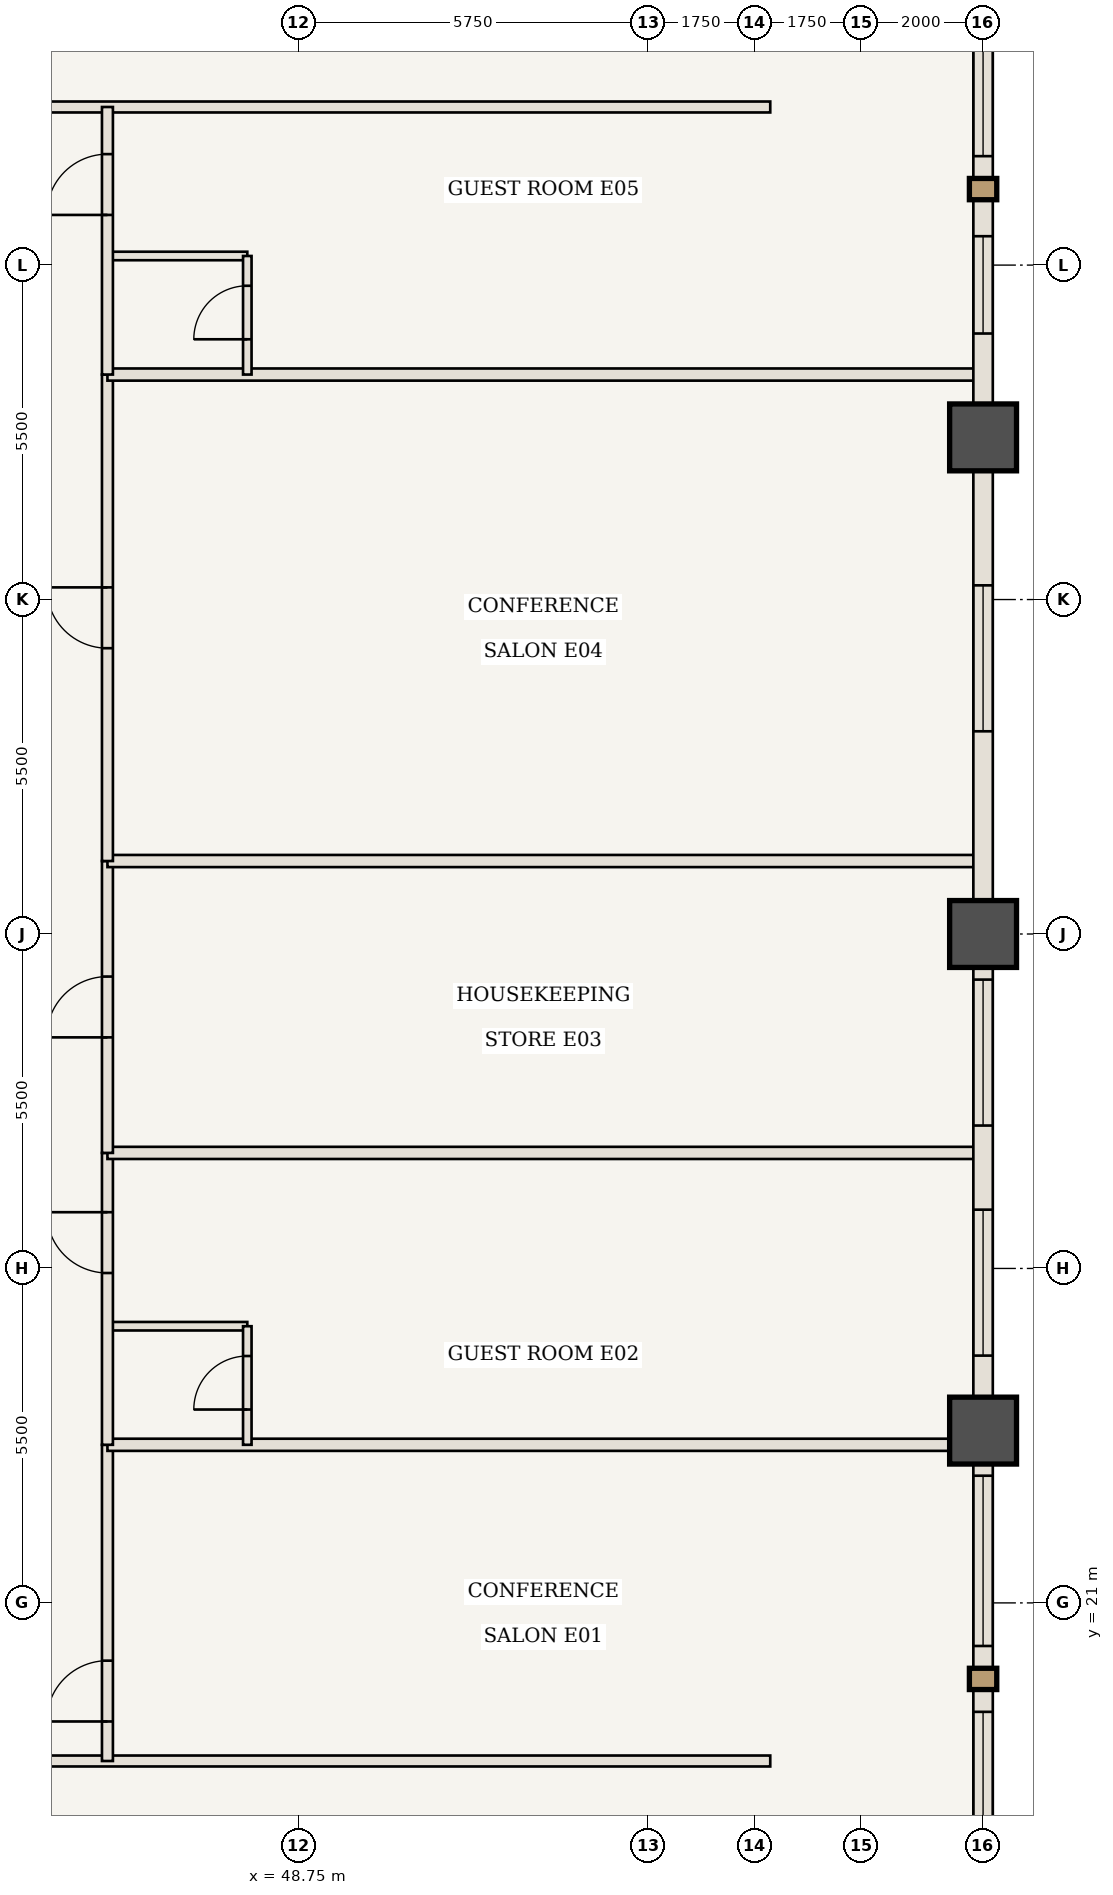
"""IFC4 building model, lengths in metres.
Left out: names, types, materials, properties, quantities, classifications, styles, units other than length and angle.
Written with IfcOpenShell. Run it as: python <this file> out.ifc"""

import sys

from ifc_helpers import new_model, si_unit, direction, frame, frame_2d, origin, origin_2d, place, context, subcontext, project, spatial, rectangle, extrude, element, fill, save


model = new_model("IFC4")
c1 = context("Model", 3, precision=1e-05, world=origin(), true_north=direction((0.0, 1.0)))
c2 = subcontext(c1, "Body", "Model", "MODEL_VIEW")
j1 = project(units=[si_unit("LENGTHUNIT", "METRE"), si_unit("PLANEANGLEUNIT", "RADIAN")], contexts=[c1])
p1 = place(None, origin())
s1 = spatial("IfcSite", under=j1, at=p1, CompositionType="ELEMENT")
p2 = place(p1, origin())
s2 = spatial("IfcBuilding", under=s1, at=p2, CompositionType="ELEMENT")
p3 = place(p2, frame((0.0, 0.0, 38.85)))
s3 = spatial("IfcBuildingStorey", under=s2, at=p3, CompositionType="ELEMENT", Elevation=38.85)
for number, where, z_axis, x_axis in (
    (1, (60.0, 23.833, 0.0), (0.0, 0.0, 1.0), (1.0, 0.0, 0.0)),
    (2, (60.0, 32.0, 0.0), (0.0, 0.0, 1.0), (1.0, 0.0, 0.0)),
    (3, (60.0, 40.167, 0.0), (0.0, 0.0, 1.0), (1.0, 0.0, 0.0)),
):
    element("IfcColumn", number, at=place(p3, frame(where, z_axis=z_axis, x_axis=x_axis)), inside=s3, PredefinedType="COLUMN", context=c2, shape_type="SweptSolid", body=[
        extrude(rectangle(XDim=1.1, YDim=1.1, at=origin_2d()), origin(), (0.0, 0.0, 1.0), 3.5),
    ])
p4 = place(p3, frame((37.9, 18.4, 0.0), z_axis=(0.0, 0.0, 1.0), x_axis=(1.0, 0.0, 0.0)))
e4 = element("IfcWall", 4, at=p4, inside=s3, PredefinedType="STANDARD", context=c2, shape_type="SweptSolid", body=[
    extrude(rectangle(XDim=18.6, YDim=0.18, at=frame_2d((9.3, 0.0))), origin(), (0.0, 0.0, 1.0), 3.08),
])
p5 = place(p4, frame((4.775, 0.0, 0.0)))
e5 = element("IfcOpeningElement", 5, at=p5, cuts=e4, PredefinedType="OPENING", context=c2, shape_type="SweptSolid", body=[
    extrude(rectangle(XDim=1.0, YDim=2.15, at=frame_2d((0.5, 1.075))), frame((0.0, 0.1, 0.0), z_axis=(0.0, -1.0, 0.0), x_axis=(1.0, 0.0, 0.0)), (0.0, 0.0, 1.0), 0.2),
])
p6 = place(p3, frame((38.2, 45.6, 0.0), z_axis=(0.0, 0.0, 1.0), x_axis=(1.0, 0.0, 0.0)))
e6 = element("IfcWall", 6, at=p6, inside=s3, PredefinedType="STANDARD", context=c2, shape_type="SweptSolid", body=[
    extrude(rectangle(XDim=18.3, YDim=0.18, at=frame_2d((9.15, 0.0))), origin(), (0.0, 0.0, 1.0), 3.08),
])
p7 = place(p6, frame((4.625, 0.0, 0.0)))
e7 = element("IfcOpeningElement", 7, at=p7, cuts=e6, PredefinedType="OPENING", context=c2, shape_type="SweptSolid", body=[
    extrude(rectangle(XDim=1.0, YDim=2.15, at=frame_2d((0.5, 1.075))), frame((0.0, 0.1, 0.0), z_axis=(0.0, -1.0, 0.0), x_axis=(1.0, 0.0, 0.0)), (0.0, 0.0, 1.0), 0.2),
])
p8 = place(p3, frame((45.6, 18.4, 0.0), z_axis=(0.0, 0.0, 1.0), x_axis=(0.0, 1.0, 0.0)))
e8 = element("IfcWall", 8, at=p8, inside=s3, PredefinedType="STANDARD", context=c2, shape_type="SweptSolid", body=[
    extrude(rectangle(XDim=5.2, YDim=0.18, at=frame_2d((2.6, 0.0))), origin(), (0.0, 0.0, 1.0), 3.08),
])
p9 = place(p8, frame((0.65, 0.0, 0.0)))
e9 = element("IfcOpeningElement", 9, at=p9, cuts=e8, PredefinedType="OPENING", context=c2, shape_type="SweptSolid", body=[
    extrude(rectangle(XDim=1.0, YDim=2.15, at=frame_2d((0.5, 1.075))), frame((0.0, 0.1, 0.0), z_axis=(0.0, -1.0, 0.0), x_axis=(1.0, 0.0, 0.0)), (0.0, 0.0, 1.0), 0.2),
])
p10 = place(p3, frame((45.6, 23.6, 0.0), z_axis=(0.0, 0.0, 1.0), x_axis=(1.0, 0.0, 0.0)))
e10 = element("IfcWall", 10, at=p10, inside=s3, PredefinedType="STANDARD", context=c2, shape_type="SweptSolid", body=[
    extrude(rectangle(XDim=14.34, YDim=0.2, at=frame_2d((7.17, 0.0))), origin(), (0.0, 0.0, 1.0), 3.08),
])
p11 = place(p3, frame((45.6, 25.55, 0.0), z_axis=(0.0, 0.0, 1.0), x_axis=(1.0, 0.0, 0.0)))
e11 = element("IfcWall", 11, at=p11, inside=s3, PredefinedType="STANDARD", context=c2, shape_type="SweptSolid", body=[
    extrude(rectangle(XDim=2.3, YDim=0.14, at=frame_2d((1.15, 0.0))), origin(), (0.0, 0.0, 1.0), 3.08),
])
p12 = place(p3, frame((47.9, 23.6, 0.0), z_axis=(0.0, 0.0, 1.0), x_axis=(0.0, 1.0, 0.0)))
e12 = element("IfcWall", 12, at=p12, inside=s3, PredefinedType="STANDARD", context=c2, shape_type="SweptSolid", body=[
    extrude(rectangle(XDim=1.95, YDim=0.14, at=frame_2d((0.975, 0.0))), origin(), (0.0, 0.0, 1.0), 3.08),
])
p13 = place(p12, frame((0.58, 0.0, 0.0)))
e13 = element("IfcOpeningElement", 13, at=p13, cuts=e12, PredefinedType="OPENING", context=c2, shape_type="SweptSolid", body=[
    extrude(rectangle(XDim=0.88, YDim=2.1, at=frame_2d((0.44, 1.05))), frame((0.0, 0.08, 0.0), z_axis=(0.0, -1.0, 0.0), x_axis=(1.0, 0.0, 0.0)), (0.0, 0.0, 1.0), 0.16),
])
p14 = place(p3, frame((45.6, 23.6, 0.0), z_axis=(0.0, 0.0, 1.0), x_axis=(0.0, 1.0, 0.0)))
e14 = element("IfcWall", 14, at=p14, inside=s3, PredefinedType="STANDARD", context=c2, shape_type="SweptSolid", body=[
    extrude(rectangle(XDim=4.8, YDim=0.18, at=frame_2d((2.4, 0.0))), origin(), (0.0, 0.0, 1.0), 3.08),
])
p15 = place(p14, frame((2.825, 0.0, 0.0)))
e15 = element("IfcOpeningElement", 15, at=p15, cuts=e14, PredefinedType="OPENING", context=c2, shape_type="SweptSolid", body=[
    extrude(rectangle(XDim=1.0, YDim=2.15, at=frame_2d((0.5, 1.075))), frame((0.0, 0.1, 0.0), z_axis=(0.0, -1.0, 0.0), x_axis=(1.0, 0.0, 0.0)), (0.0, 0.0, 1.0), 0.2),
])
p16 = place(p3, frame((45.6, 28.4, 0.0), z_axis=(0.0, 0.0, 1.0), x_axis=(1.0, 0.0, 0.0)))
e16 = element("IfcWall", 16, at=p16, inside=s3, PredefinedType="STANDARD", context=c2, shape_type="SweptSolid", body=[
    extrude(rectangle(XDim=14.34, YDim=0.2, at=frame_2d((7.17, 0.0))), origin(), (0.0, 0.0, 1.0), 3.08),
])
p17 = place(p3, frame((45.6, 28.4, 0.0), z_axis=(0.0, 0.0, 1.0), x_axis=(0.0, 1.0, 0.0)))
e17 = element("IfcWall", 17, at=p17, inside=s3, PredefinedType="STANDARD", context=c2, shape_type="SweptSolid", body=[
    extrude(rectangle(XDim=4.8, YDim=0.18, at=frame_2d((2.4, 0.0))), origin(), (0.0, 0.0, 1.0), 3.08),
])
p18 = place(p17, frame((1.9, 0.0, 0.0)))
e18 = element("IfcOpeningElement", 18, at=p18, cuts=e17, PredefinedType="OPENING", context=c2, shape_type="SweptSolid", body=[
    extrude(rectangle(XDim=1.0, YDim=2.15, at=frame_2d((0.5, 1.075))), frame((0.0, 0.1, 0.0), z_axis=(0.0, -1.0, 0.0), x_axis=(1.0, 0.0, 0.0)), (0.0, 0.0, 1.0), 0.2),
])
p19 = place(p3, frame((45.6, 33.2, 0.0), z_axis=(0.0, 0.0, 1.0), x_axis=(1.0, 0.0, 0.0)))
e19 = element("IfcWall", 19, at=p19, inside=s3, PredefinedType="STANDARD", context=c2, shape_type="SweptSolid", body=[
    extrude(rectangle(XDim=14.34, YDim=0.2, at=frame_2d((7.17, 0.0))), origin(), (0.0, 0.0, 1.0), 3.08),
])
p20 = place(p3, frame((45.6, 33.2, 0.0), z_axis=(0.0, 0.0, 1.0), x_axis=(0.0, 1.0, 0.0)))
e20 = element("IfcWall", 20, at=p20, inside=s3, PredefinedType="STANDARD", context=c2, shape_type="SweptSolid", body=[
    extrude(rectangle(XDim=8.0, YDim=0.18, at=frame_2d((4.0, 0.0))), origin(), (0.0, 0.0, 1.0), 3.08),
])
p21 = place(p20, frame((3.5, 0.0, 0.0)))
e21 = element("IfcOpeningElement", 21, at=p21, cuts=e20, PredefinedType="OPENING", context=c2, shape_type="SweptSolid", body=[
    extrude(rectangle(XDim=1.0, YDim=2.15, at=frame_2d((0.5, 1.075))), frame((0.0, 0.1, 0.0), z_axis=(0.0, -1.0, 0.0), x_axis=(1.0, 0.0, 0.0)), (0.0, 0.0, 1.0), 0.2),
])
p22 = place(p3, frame((45.6, 41.2, 0.0), z_axis=(0.0, 0.0, 1.0), x_axis=(1.0, 0.0, 0.0)))
e22 = element("IfcWall", 22, at=p22, inside=s3, PredefinedType="STANDARD", context=c2, shape_type="SweptSolid", body=[
    extrude(rectangle(XDim=14.34, YDim=0.2, at=frame_2d((7.17, 0.0))), origin(), (0.0, 0.0, 1.0), 3.08),
])
p23 = place(p3, frame((45.6, 43.15, 0.0), z_axis=(0.0, 0.0, 1.0), x_axis=(1.0, 0.0, 0.0)))
e23 = element("IfcWall", 23, at=p23, inside=s3, PredefinedType="STANDARD", context=c2, shape_type="SweptSolid", body=[
    extrude(rectangle(XDim=2.3, YDim=0.14, at=frame_2d((1.15, 0.0))), origin(), (0.0, 0.0, 1.0), 2.375),
])
p24 = place(p3, frame((47.9, 41.2, 0.0), z_axis=(0.0, 0.0, 1.0), x_axis=(0.0, 1.0, 0.0)))
e24 = element("IfcWall", 24, at=p24, inside=s3, PredefinedType="STANDARD", context=c2, shape_type="SweptSolid", body=[
    extrude(rectangle(XDim=1.95, YDim=0.14, at=frame_2d((0.975, 0.0))), origin(), (0.0, 0.0, 1.0), 3.08),
])
p25 = place(p24, frame((0.58, 0.0, 0.0)))
e25 = element("IfcOpeningElement", 25, at=p25, cuts=e24, PredefinedType="OPENING", context=c2, shape_type="SweptSolid", body=[
    extrude(rectangle(XDim=0.88, YDim=2.1, at=frame_2d((0.44, 1.05))), frame((0.0, 0.08, 0.0), z_axis=(0.0, -1.0, 0.0), x_axis=(1.0, 0.0, 0.0)), (0.0, 0.0, 1.0), 0.16),
])
p26 = place(p3, frame((45.6, 41.2, 0.0), z_axis=(0.0, 0.0, 1.0), x_axis=(0.0, 1.0, 0.0)))
e26 = element("IfcWall", 26, at=p26, inside=s3, PredefinedType="STANDARD", context=c2, shape_type="SweptSolid", body=[
    extrude(rectangle(XDim=4.4, YDim=0.18, at=frame_2d((2.2, 0.0))), origin(), (0.0, 0.0, 1.0), 3.08),
])
p27 = place(p26, frame((2.625, 0.0, 0.0)))
e27 = element("IfcOpeningElement", 27, at=p27, cuts=e26, PredefinedType="OPENING", context=c2, shape_type="SweptSolid", body=[
    extrude(rectangle(XDim=1.0, YDim=2.15, at=frame_2d((0.5, 1.075))), frame((0.0, 0.1, 0.0), z_axis=(0.0, -1.0, 0.0), x_axis=(1.0, 0.0, 0.0)), (0.0, 0.0, 1.0), 0.2),
])
p28 = place(p3, frame((60.0, 23.833, 0.0), z_axis=(0.0, 0.0, 1.0), x_axis=(0.0, -1.0, 0.0)))
e28 = element("IfcWall", 28, at=p28, inside=s3, PredefinedType="USERDEFINED", context=c2, shape_type="SweptSolid", body=[
    extrude(rectangle(XDim=8.167, YDim=0.32, at=frame_2d((4.083, 0.0))), origin(), (0.0, 0.0, 1.0), 2.28),
])
p29 = place(p28, frame((0.742, 0.0, 0.85)))
e29 = element("IfcOpeningElement", 29, at=p29, cuts=e28, PredefinedType="OPENING", context=c2, shape_type="SweptSolid", body=[
    extrude(rectangle(XDim=2.8, YDim=1.23, at=frame_2d((1.4, 0.615))), frame((0.0, 0.17, 0.0), z_axis=(0.0, -1.0, 0.0), x_axis=(1.0, 0.0, 0.0)), (0.0, 0.0, 1.0), 0.34),
])
p30 = place(p28, frame((4.625, 0.0, 0.85)))
e30 = element("IfcOpeningElement", 30, at=p30, cuts=e28, PredefinedType="OPENING", context=c2, shape_type="SweptSolid", body=[
    extrude(rectangle(XDim=2.8, YDim=1.23, at=frame_2d((1.4, 0.615))), frame((0.0, 0.17, 0.0), z_axis=(0.0, -1.0, 0.0), x_axis=(1.0, 0.0, 0.0)), (0.0, 0.0, 1.0), 0.34),
])
p31 = place(p3, frame((60.0, 32.0, 0.0), z_axis=(0.0, 0.0, 1.0), x_axis=(0.0, -1.0, 0.0)))
e31 = element("IfcWall", 31, at=p31, inside=s3, PredefinedType="USERDEFINED", context=c2, shape_type="SweptSolid", body=[
    extrude(rectangle(XDim=8.167, YDim=0.32, at=frame_2d((4.083, 0.0))), origin(), (0.0, 0.0, 1.0), 2.28),
])
p32 = place(p31, frame((0.75, 0.0, 0.85)))
e32 = element("IfcOpeningElement", 32, at=p32, cuts=e31, PredefinedType="OPENING", context=c2, shape_type="SweptSolid", body=[
    extrude(rectangle(XDim=2.4, YDim=1.23, at=frame_2d((1.2, 0.615))), frame((0.0, 0.17, 0.0), z_axis=(0.0, -1.0, 0.0), x_axis=(1.0, 0.0, 0.0)), (0.0, 0.0, 1.0), 0.34),
])
p33 = place(p31, frame((4.533, 0.0, 0.85)))
e33 = element("IfcOpeningElement", 33, at=p33, cuts=e31, PredefinedType="OPENING", context=c2, shape_type="SweptSolid", body=[
    extrude(rectangle(XDim=2.4, YDim=1.23, at=frame_2d((1.2, 0.615))), frame((0.0, 0.17, 0.0), z_axis=(0.0, -1.0, 0.0), x_axis=(1.0, 0.0, 0.0)), (0.0, 0.0, 1.0), 0.34),
])
p34 = place(p3, frame((60.0, 40.167, 0.0), z_axis=(0.0, 0.0, 1.0), x_axis=(0.0, -1.0, 0.0)))
e34 = element("IfcWall", 34, at=p34, inside=s3, PredefinedType="USERDEFINED", context=c2, shape_type="SweptSolid", body=[
    extrude(rectangle(XDim=8.167, YDim=0.32, at=frame_2d((4.083, 0.0))), origin(), (0.0, 0.0, 1.0), 2.28),
])
p35 = place(p34, frame((2.433, 0.0, 0.85)))
e35 = element("IfcOpeningElement", 35, at=p35, cuts=e34, PredefinedType="OPENING", context=c2, shape_type="SweptSolid", body=[
    extrude(rectangle(XDim=2.4, YDim=1.23, at=frame_2d((1.2, 0.615))), frame((0.0, 0.17, 0.0), z_axis=(0.0, -1.0, 0.0), x_axis=(1.0, 0.0, 0.0)), (0.0, 0.0, 1.0), 0.34),
])
p36 = place(p3, frame((60.0, 48.333, 0.0), z_axis=(0.0, 0.0, 1.0), x_axis=(0.0, -1.0, 0.0)))
e36 = element("IfcWall", 36, at=p36, inside=s3, PredefinedType="USERDEFINED", context=c2, shape_type="SweptSolid", body=[
    extrude(rectangle(XDim=8.167, YDim=0.32, at=frame_2d((4.083, 0.0))), origin(), (0.0, 0.0, 1.0), 2.28),
])
p37 = place(p36, frame((0.742, 0.0, 0.85)))
e37 = element("IfcOpeningElement", 37, at=p37, cuts=e36, PredefinedType="OPENING", context=c2, shape_type="SweptSolid", body=[
    extrude(rectangle(XDim=2.8, YDim=1.23, at=frame_2d((1.4, 0.615))), frame((0.0, 0.17, 0.0), z_axis=(0.0, -1.0, 0.0), x_axis=(1.0, 0.0, 0.0)), (0.0, 0.0, 1.0), 0.34),
])
p38 = place(p36, frame((4.858, 0.0, 0.85)))
e38 = element("IfcOpeningElement", 38, at=p38, cuts=e36, PredefinedType="OPENING", context=c2, shape_type="SweptSolid", body=[
    extrude(rectangle(XDim=1.6, YDim=1.23, at=frame_2d((0.8, 0.615))), frame((0.0, 0.17, 0.0), z_axis=(0.0, -1.0, 0.0), x_axis=(1.0, 0.0, 0.0)), (0.0, 0.0, 1.0), 0.34),
])
p39 = place(p9, origin())
e39 = element("IfcDoor", 39, at=p39, inside=s3, OperationType="SINGLE_SWING_LEFT", PredefinedType="DOOR", context=c2, shape_type="SweptSolid", body=[
    extrude(rectangle(XDim=1.0, YDim=2.15, at=frame_2d((0.5, 1.075))), frame((0.0, 0.025, 0.0), z_axis=(0.0, -1.0, 0.0), x_axis=(1.0, 0.0, 0.0)), (0.0, 0.0, 1.0), 0.05),
])
fill(e9, e39)
p40 = place(p13, origin())
e40 = element("IfcDoor", 40, at=p40, inside=s3, OperationType="SINGLE_SWING_LEFT", PredefinedType="DOOR", context=c2, shape_type="SweptSolid", body=[
    extrude(rectangle(XDim=0.88, YDim=2.1, at=frame_2d((0.44, 1.05))), frame((0.0, 0.025, 0.0), z_axis=(0.0, -1.0, 0.0), x_axis=(1.0, 0.0, 0.0)), (0.0, 0.0, 1.0), 0.05),
])
fill(e13, e40)
p41 = place(p15, origin())
e41 = element("IfcDoor", 41, at=p41, inside=s3, OperationType="SINGLE_SWING_RIGHT", PredefinedType="DOOR", context=c2, shape_type="SweptSolid", body=[
    extrude(rectangle(XDim=1.0, YDim=2.15, at=frame_2d((0.5, 1.075))), frame((0.0, 0.025, 0.0), z_axis=(0.0, -1.0, 0.0), x_axis=(1.0, 0.0, 0.0)), (0.0, 0.0, 1.0), 0.05),
])
fill(e15, e41)
p42 = place(p18, origin())
e42 = element("IfcDoor", 42, at=p42, inside=s3, OperationType="SINGLE_SWING_LEFT", PredefinedType="DOOR", context=c2, shape_type="SweptSolid", body=[
    extrude(rectangle(XDim=1.0, YDim=2.15, at=frame_2d((0.5, 1.075))), frame((0.0, 0.025, 0.0), z_axis=(0.0, -1.0, 0.0), x_axis=(1.0, 0.0, 0.0)), (0.0, 0.0, 1.0), 0.05),
])
fill(e18, e42)
p43 = place(p21, origin())
e43 = element("IfcDoor", 43, at=p43, inside=s3, OperationType="SINGLE_SWING_RIGHT", PredefinedType="DOOR", context=c2, shape_type="SweptSolid", body=[
    extrude(rectangle(XDim=1.0, YDim=2.15, at=frame_2d((0.5, 1.075))), frame((0.0, 0.025, 0.0), z_axis=(0.0, -1.0, 0.0), x_axis=(1.0, 0.0, 0.0)), (0.0, 0.0, 1.0), 0.05),
])
fill(e21, e43)
p44 = place(p25, origin())
e44 = element("IfcDoor", 44, at=p44, inside=s3, OperationType="SINGLE_SWING_LEFT", PredefinedType="DOOR", context=c2, shape_type="SweptSolid", body=[
    extrude(rectangle(XDim=0.88, YDim=2.1, at=frame_2d((0.44, 1.05))), frame((0.0, 0.025, 0.0), z_axis=(0.0, -1.0, 0.0), x_axis=(1.0, 0.0, 0.0)), (0.0, 0.0, 1.0), 0.05),
])
fill(e25, e44)
p45 = place(p27, origin())
e45 = element("IfcDoor", 45, at=p45, inside=s3, OperationType="SINGLE_SWING_LEFT", PredefinedType="DOOR", context=c2, shape_type="SweptSolid", body=[
    extrude(rectangle(XDim=1.0, YDim=2.15, at=frame_2d((0.5, 1.075))), frame((0.0, 0.025, 0.0), z_axis=(0.0, -1.0, 0.0), x_axis=(1.0, 0.0, 0.0)), (0.0, 0.0, 1.0), 0.05),
])
fill(e27, e45)
p46 = place(p29, origin())
e46 = element("IfcWindow", 46, at=p46, inside=s3, PartitioningType="SINGLE_PANEL", PredefinedType="WINDOW", context=c2, shape_type="SweptSolid", body=[
    extrude(rectangle(XDim=2.8, YDim=1.23, at=frame_2d((1.4, 0.615))), frame((0.0, 0.03, 0.0), z_axis=(0.0, -1.0, 0.0), x_axis=(1.0, 0.0, 0.0)), (0.0, 0.0, 1.0), 0.06),
])
fill(e29, e46)
p47 = place(p30, origin())
e47 = element("IfcWindow", 47, at=p47, inside=s3, PartitioningType="SINGLE_PANEL", PredefinedType="WINDOW", context=c2, shape_type="SweptSolid", body=[
    extrude(rectangle(XDim=2.8, YDim=1.23, at=frame_2d((1.4, 0.615))), frame((0.0, 0.03, 0.0), z_axis=(0.0, -1.0, 0.0), x_axis=(1.0, 0.0, 0.0)), (0.0, 0.0, 1.0), 0.06),
])
fill(e30, e47)
p48 = place(p32, origin())
e48 = element("IfcWindow", 48, at=p48, inside=s3, PartitioningType="SINGLE_PANEL", PredefinedType="WINDOW", context=c2, shape_type="SweptSolid", body=[
    extrude(rectangle(XDim=2.4, YDim=1.23, at=frame_2d((1.2, 0.615))), frame((0.0, 0.03, 0.0), z_axis=(0.0, -1.0, 0.0), x_axis=(1.0, 0.0, 0.0)), (0.0, 0.0, 1.0), 0.06),
])
fill(e32, e48)
p49 = place(p33, origin())
e49 = element("IfcWindow", 49, at=p49, inside=s3, PartitioningType="SINGLE_PANEL", PredefinedType="WINDOW", context=c2, shape_type="SweptSolid", body=[
    extrude(rectangle(XDim=2.4, YDim=1.23, at=frame_2d((1.2, 0.615))), frame((0.0, 0.03, 0.0), z_axis=(0.0, -1.0, 0.0), x_axis=(1.0, 0.0, 0.0)), (0.0, 0.0, 1.0), 0.06),
])
fill(e33, e49)
p50 = place(p35, origin())
e50 = element("IfcWindow", 50, at=p50, inside=s3, PartitioningType="SINGLE_PANEL", PredefinedType="WINDOW", context=c2, shape_type="SweptSolid", body=[
    extrude(rectangle(XDim=2.4, YDim=1.23, at=frame_2d((1.2, 0.615))), frame((0.0, 0.03, 0.0), z_axis=(0.0, -1.0, 0.0), x_axis=(1.0, 0.0, 0.0)), (0.0, 0.0, 1.0), 0.06),
])
fill(e35, e50)
p51 = place(p37, origin())
e51 = element("IfcWindow", 51, at=p51, inside=s3, PartitioningType="SINGLE_PANEL", PredefinedType="WINDOW", context=c2, shape_type="SweptSolid", body=[
    extrude(rectangle(XDim=2.8, YDim=1.23, at=frame_2d((1.4, 0.615))), frame((0.0, 0.03, 0.0), z_axis=(0.0, -1.0, 0.0), x_axis=(1.0, 0.0, 0.0)), (0.0, 0.0, 1.0), 0.06),
])
fill(e37, e51)
p52 = place(p38, origin())
e52 = element("IfcWindow", 52, at=p52, inside=s3, PartitioningType="SINGLE_PANEL", PredefinedType="WINDOW", context=c2, shape_type="SweptSolid", body=[
    extrude(rectangle(XDim=1.6, YDim=1.23, at=frame_2d((0.8, 0.615))), frame((0.0, 0.03, 0.0), z_axis=(0.0, -1.0, 0.0), x_axis=(1.0, 0.0, 0.0)), (0.0, 0.0, 1.0), 0.06),
])
fill(e38, e52)
save(model, sys.argv[1])
